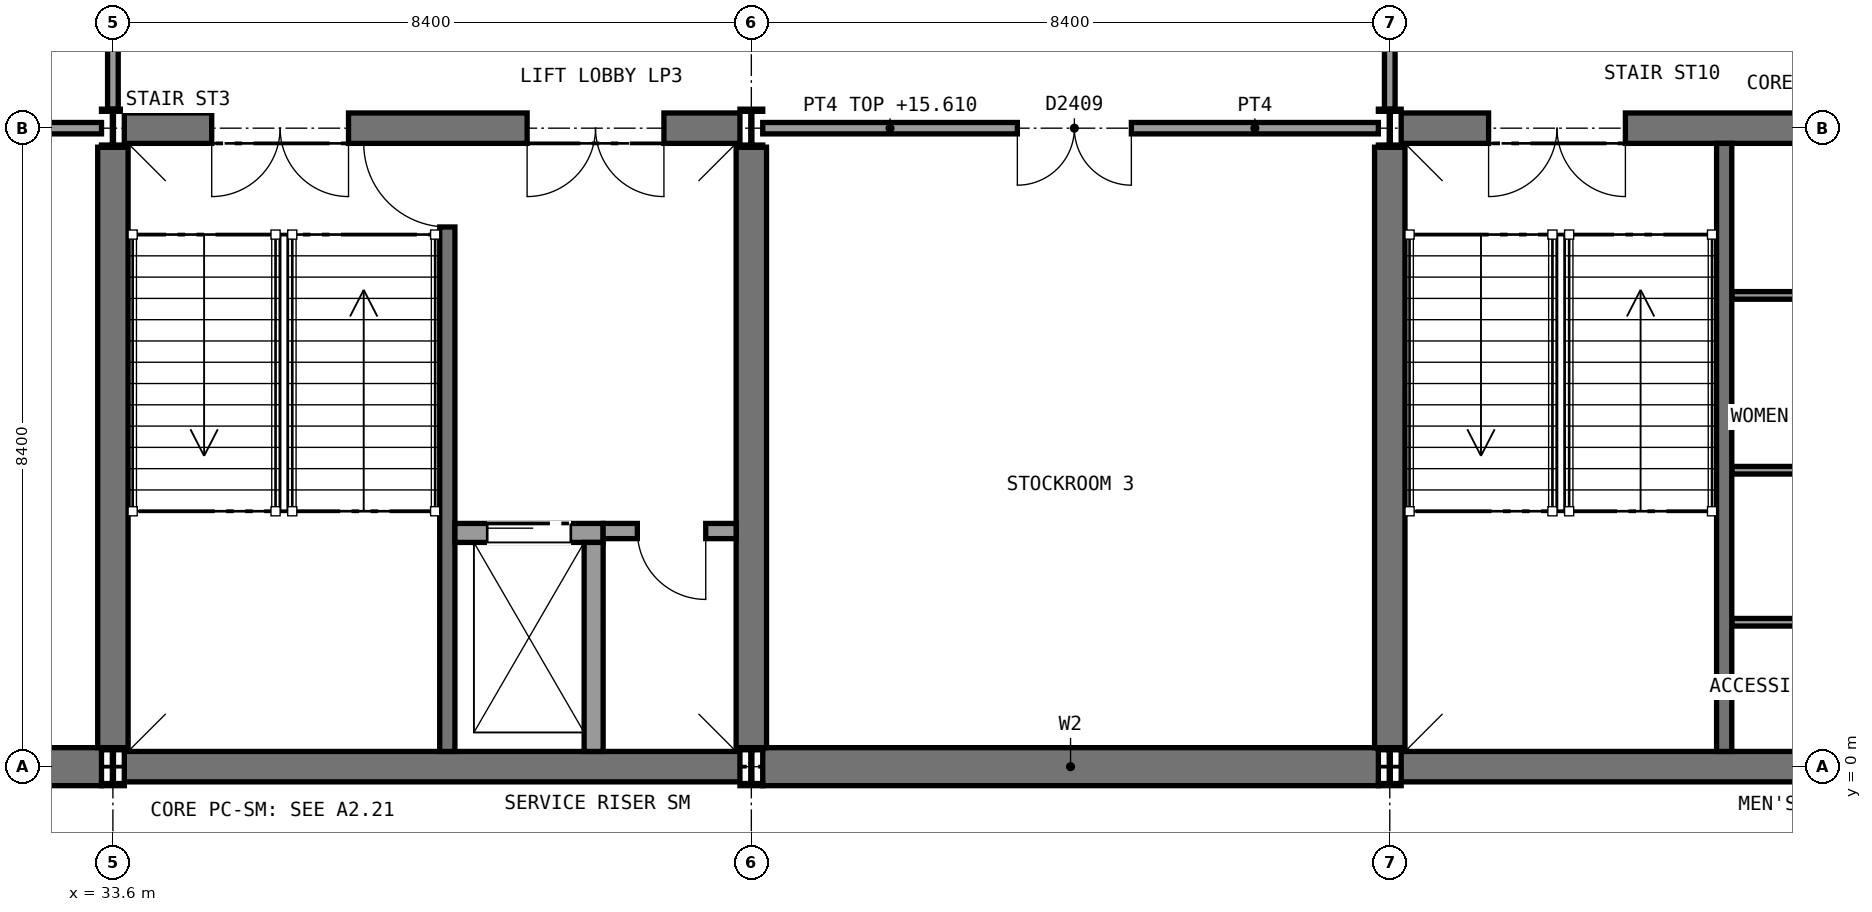
"""IFC4 building model, lengths in metres.
Left out: names, types, materials, properties, quantities, classifications, styles, units other than length and angle.
Written with IfcOpenShell. Run it as: python <this file> out.ifc"""

import sys

from ifc_helpers import new_model, si_unit, direction, frame, frame_2d, origin, origin_2d, place, context, subcontext, project, spatial, rectangle, i_section, extrude, element, fill, save


model = new_model("IFC4")
c1 = context("Model", 3, precision=1e-05, world=origin(), true_north=direction((0.0, 1.0)))
c2 = subcontext(c1, "Body", "Model", "MODEL_VIEW")
j1 = project(units=[si_unit("LENGTHUNIT", "METRE"), si_unit("PLANEANGLEUNIT", "RADIAN")], contexts=[c1])
p1 = place(None, origin())
s1 = spatial("IfcSite", under=j1, at=p1, CompositionType="ELEMENT")
p2 = place(p1, origin())
s2 = spatial("IfcBuilding", under=s1, at=p2, CompositionType="ELEMENT")
p3 = place(p2, frame((0.0, 0.0, 11.4)))
s3 = spatial("IfcBuildingStorey", under=s2, at=p3, CompositionType="ELEMENT", Elevation=11.4)
p4 = place(p3, frame((25.35, 0.0, 0.0), z_axis=(0.0, 0.0, 1.0), x_axis=(1.0, 0.0, 0.0)))
e1 = element("IfcWall", 1, at=p4, inside=s3, PredefinedType="SHEAR", context=c2, shape_type="SweptSolid", body=[
    extrude(rectangle(XDim=8.1, YDim=0.5, at=frame_2d((4.05, 0.0))), origin(), (0.0, 0.0, 1.0), 4.65),
])
p5 = place(p3, frame((42.15, 0.0, 0.0), z_axis=(0.0, 0.0, 1.0), x_axis=(1.0, 0.0, 0.0)))
e2 = element("IfcWall", 2, at=p5, inside=s3, PredefinedType="SHEAR", context=c2, shape_type="SweptSolid", body=[
    extrude(rectangle(XDim=8.1, YDim=0.5, at=frame_2d((4.05, 0.0))), origin(), (0.0, 0.0, 1.0), 4.65),
])
p6 = place(p3, frame((33.75, 0.0, 0.0), z_axis=(0.0, 0.0, 1.0), x_axis=(1.0, 0.0, 0.0)))
e3 = element("IfcWall", 3, at=p6, inside=s3, PredefinedType="SHEAR", context=c2, shape_type="SweptSolid", body=[
    extrude(rectangle(XDim=8.1, YDim=0.4, at=frame_2d((4.05, 0.0))), origin(), (0.0, 0.0, 1.0), 4.65),
])
p7 = place(p3, frame((33.75, 8.4, 0.0), z_axis=(0.0, 0.0, 1.0), x_axis=(1.0, 0.0, 0.0)))
e4 = element("IfcWall", 4, at=p7, inside=s3, PredefinedType="SHEAR", context=c2, shape_type="SweptSolid", body=[
    extrude(rectangle(XDim=8.1, YDim=0.4, at=frame_2d((4.05, 0.0))), origin(), (0.0, 0.0, 1.0), 4.65),
])
p8 = place(p7, frame((1.15, 0.0, 0.0)))
e5 = element("IfcOpeningElement", 5, at=p8, cuts=e4, PredefinedType="OPENING", context=c2, shape_type="SweptSolid", body=[
    extrude(rectangle(XDim=1.8, YDim=2.1, at=frame_2d((0.9, 1.05))), frame((0.0, 0.21, 0.0), z_axis=(0.0, -1.0, 0.0), x_axis=(1.0, 0.0, 0.0)), (0.0, 0.0, 1.0), 0.42),
])
p9 = place(p7, frame((5.3, 0.0, 0.0)))
e6 = element("IfcOpeningElement", 6, at=p9, cuts=e4, PredefinedType="OPENING", context=c2, shape_type="SweptSolid", body=[
    extrude(rectangle(XDim=1.8, YDim=2.1, at=frame_2d((0.9, 1.05))), frame((0.0, 0.21, 0.0), z_axis=(0.0, -1.0, 0.0), x_axis=(1.0, 0.0, 0.0)), (0.0, 0.0, 1.0), 0.42),
])
for number, where, z_axis, x_axis in (
    (7, (33.6, 0.25, 0.0), (0.0, 0.0, 1.0), (0.0, 1.0, 0.0)),
    (8, (42.0, 0.25, 0.0), (0.0, 0.0, 1.0), (0.0, 1.0, 0.0)),
):
    element("IfcWall", number, at=place(p3, frame(where, z_axis=z_axis, x_axis=x_axis)), inside=s3, PredefinedType="SHEAR", context=c2, shape_type="SweptSolid", body=[
        extrude(rectangle(XDim=7.9, YDim=0.4, at=frame_2d((3.95, 0.0))), origin(), (0.0, 0.0, 1.0), 4.65),
    ])
p10 = place(p3, frame((50.55, 0.0, 0.0), z_axis=(0.0, 0.0, 1.0), x_axis=(1.0, 0.0, 0.0)))
e9 = element("IfcWall", 9, at=p10, inside=s3, PredefinedType="SHEAR", context=c2, shape_type="SweptSolid", body=[
    extrude(rectangle(XDim=8.1, YDim=0.4, at=frame_2d((4.05, 0.0))), origin(), (0.0, 0.0, 1.0), 4.65),
])
p11 = place(p3, frame((50.55, 8.4, 0.0), z_axis=(0.0, 0.0, 1.0), x_axis=(1.0, 0.0, 0.0)))
e10 = element("IfcWall", 10, at=p11, inside=s3, PredefinedType="SHEAR", context=c2, shape_type="SweptSolid", body=[
    extrude(rectangle(XDim=8.1, YDim=0.4, at=frame_2d((4.05, 0.0))), origin(), (0.0, 0.0, 1.0), 4.65),
])
p12 = place(p11, frame((1.15, 0.0, 0.0)))
e11 = element("IfcOpeningElement", 11, at=p12, cuts=e10, PredefinedType="OPENING", context=c2, shape_type="SweptSolid", body=[
    extrude(rectangle(XDim=1.8, YDim=2.1, at=frame_2d((0.9, 1.05))), frame((0.0, 0.21, 0.0), z_axis=(0.0, -1.0, 0.0), x_axis=(1.0, 0.0, 0.0)), (0.0, 0.0, 1.0), 0.42),
])
p13 = place(p11, frame((5.6, 0.0, 0.0)))
e12 = element("IfcOpeningElement", 12, at=p13, cuts=e10, PredefinedType="OPENING", context=c2, shape_type="SweptSolid", body=[
    extrude(rectangle(XDim=1.2, YDim=2.1, at=frame_2d((0.6, 1.05))), frame((0.0, 0.21, 0.0), z_axis=(0.0, -1.0, 0.0), x_axis=(1.0, 0.0, 0.0)), (0.0, 0.0, 1.0), 0.42),
])
p14 = place(p3, frame((50.4, 0.25, 0.0), z_axis=(0.0, 0.0, 1.0), x_axis=(0.0, 1.0, 0.0)))
e13 = element("IfcWall", 13, at=p14, inside=s3, PredefinedType="SHEAR", context=c2, shape_type="SweptSolid", body=[
    extrude(rectangle(XDim=7.9, YDim=0.4, at=frame_2d((3.95, 0.0))), origin(), (0.0, 0.0, 1.0), 4.65),
])
for number, where, z_axis, x_axis in (
    (14, (33.6, 0.0, 0.0), (0.0, 0.0, 1.0), (1.0, 0.0, 0.0)),
    (15, (33.6, 8.4, 0.0), (0.0, 0.0, 1.0), (1.0, 0.0, 0.0)),
    (16, (42.0, 0.0, 0.0), (0.0, 0.0, 1.0), (1.0, 0.0, 0.0)),
    (17, (42.0, 8.4, 0.0), (0.0, 0.0, 1.0), (1.0, 0.0, 0.0)),
    (18, (50.4, 0.0, 0.0), (0.0, 0.0, 1.0), (1.0, 0.0, 0.0)),
    (19, (50.4, 8.4, 0.0), (0.0, 0.0, 1.0), (1.0, 0.0, 0.0)),
):
    element("IfcColumn", number, at=place(p3, frame(where, z_axis=z_axis, x_axis=x_axis)), inside=s3, PredefinedType="COLUMN", context=c2, shape_type="SweptSolid", body=[
        extrude(i_section(OverallWidth=0.3, OverallDepth=0.5, WebThickness=0.014, FlangeThickness=0.028, FilletRadius=0.027, at=origin_2d()), origin(), (0.0, 0.0, 1.0), 4.8),
    ])
p15 = place(p3, frame((54.9, 6.2, 0.0), z_axis=(0.0, 0.0, 1.0), x_axis=(1.0, 0.0, 0.0)))
e20 = element("IfcWall", 20, at=p15, inside=s3, PredefinedType="PARTITIONING", context=c2, shape_type="SweptSolid", body=[
    extrude(rectangle(XDim=2.4, YDim=0.1, at=frame_2d((1.2, 0.0))), origin(), (0.0, 0.0, 1.0), 4.58),
])
p16 = place(p15, frame((0.85, 0.0, 0.0)))
e21 = element("IfcOpeningElement", 21, at=p16, cuts=e20, PredefinedType="OPENING", context=c2, shape_type="SweptSolid", body=[
    extrude(rectangle(XDim=0.9, YDim=2.1, at=frame_2d((0.45, 1.05))), frame((0.0, 0.06, 0.0), z_axis=(0.0, -1.0, 0.0), x_axis=(1.0, 0.0, 0.0)), (0.0, 0.0, 1.0), 0.12),
])
for number, where, z_axis, x_axis in (
    (22, (54.9, 3.9, 0.0), (0.0, 0.0, 1.0), (1.0, 0.0, 0.0)),
    (23, (54.9, 1.9, 0.0), (0.0, 0.0, 1.0), (1.0, 0.0, 0.0)),
):
    element("IfcWall", number, at=place(p3, frame(where, z_axis=z_axis, x_axis=x_axis)), inside=s3, PredefinedType="PARTITIONING", context=c2, shape_type="SweptSolid", body=[
        extrude(rectangle(XDim=2.4, YDim=0.1, at=frame_2d((1.2, 0.0))), origin(), (0.0, 0.0, 1.0), 4.58),
    ])
p17 = place(p3, frame((25.35, 8.4, 0.0), z_axis=(0.0, 0.0, 1.0), x_axis=(1.0, 0.0, 0.0)))
e24 = element("IfcWall", 24, at=p17, inside=s3, PredefinedType="SOLIDWALL", context=c2, shape_type="SweptSolid", body=[
    extrude(rectangle(XDim=8.1, YDim=0.15, at=frame_2d((4.05, 0.0))), origin(), (0.0, 0.0, 1.0), 4.32),
])
p18 = place(p17, frame((3.35, 0.0, 0.0)))
e25 = element("IfcOpeningElement", 25, at=p18, cuts=e24, PredefinedType="OPENING", context=c2, shape_type="SweptSolid", body=[
    extrude(rectangle(XDim=1.5, YDim=2.1, at=frame_2d((0.75, 1.05))), frame((0.0, 0.085, 0.0), z_axis=(0.0, -1.0, 0.0), x_axis=(1.0, 0.0, 0.0)), (0.0, 0.0, 1.0), 0.17),
])
p19 = place(p3, frame((42.15, 8.4, 0.0), z_axis=(0.0, 0.0, 1.0), x_axis=(1.0, 0.0, 0.0)))
e26 = element("IfcWall", 26, at=p19, inside=s3, PredefinedType="SOLIDWALL", context=c2, shape_type="SweptSolid", body=[
    extrude(rectangle(XDim=8.1, YDim=0.15, at=frame_2d((4.05, 0.0))), origin(), (0.0, 0.0, 1.0), 4.21),
])
p20 = place(p19, frame((3.35, 0.0, 0.0)))
e27 = element("IfcOpeningElement", 27, at=p20, cuts=e26, PredefinedType="OPENING", context=c2, shape_type="SweptSolid", body=[
    extrude(rectangle(XDim=1.5, YDim=2.1, at=frame_2d((0.75, 1.05))), frame((0.0, 0.085, 0.0), z_axis=(0.0, -1.0, 0.0), x_axis=(1.0, 0.0, 0.0)), (0.0, 0.0, 1.0), 0.17),
])
for number, where, z_axis, x_axis in (
    (28, (33.6, 8.65, 0.0), (0.0, 0.0, 1.0), (0.0, 1.0, 0.0)),
    (29, (50.4, 8.65, 0.0), (0.0, 0.0, 1.0), (0.0, 1.0, 0.0)),
):
    element("IfcWall", number, at=place(p3, frame(where, z_axis=z_axis, x_axis=x_axis)), inside=s3, PredefinedType="PARTITIONING", context=c2, shape_type="SweptSolid", body=[
        extrude(rectangle(XDim=3.1, YDim=0.14, at=frame_2d((1.55, 0.0))), origin(), (0.0, 0.0, 1.0), 4.21),
    ])
p21 = place(p3, frame((38.0, 0.2, 0.0), z_axis=(0.0, 0.0, 1.0), x_axis=(0.0, 1.0, 0.0)))
e30 = element("IfcWall", 30, at=p21, inside=s3, PredefinedType="SHEAR", context=c2, shape_type="SweptSolid", body=[
    extrude(rectangle(XDim=8.0, YDim=0.2, at=frame_2d((4.0, 0.0))), origin(), (0.0, 0.0, 1.0), 4.65),
])
p22 = place(p21, frame((6.9, 0.0, 0.0)))
e31 = element("IfcOpeningElement", 31, at=p22, cuts=e30, PredefinedType="OPENING", context=c2, shape_type="SweptSolid", body=[
    extrude(rectangle(XDim=1.11, YDim=2.1, at=frame_2d((0.555, 1.05))), frame((0.0, 0.11, 0.0), z_axis=(0.0, -1.0, 0.0), x_axis=(1.0, 0.0, 0.0)), (0.0, 0.0, 1.0), 0.22),
])
p23 = place(p3, frame((38.1, 3.075, 0.0), z_axis=(0.0, 0.0, 1.0), x_axis=(1.0, 0.0, 0.0)))
e32 = element("IfcWall", 32, at=p23, inside=s3, PredefinedType="SOLIDWALL", context=c2, shape_type="SweptSolid", body=[
    extrude(rectangle(XDim=1.95, YDim=0.25, at=frame_2d((0.975, 0.0))), origin(), (0.0, 0.0, 1.0), 4.8),
])
p24 = place(p23, frame((0.425, 0.0, 0.0)))
e33 = element("IfcOpeningElement", 33, at=p24, cuts=e32, PredefinedType="OPENING", context=c2, shape_type="SweptSolid", body=[
    extrude(rectangle(XDim=1.1, YDim=2.1, at=frame_2d((0.55, 1.05))), frame((0.0, 0.135, 0.0), z_axis=(0.0, -1.0, 0.0), x_axis=(1.0, 0.0, 0.0)), (0.0, 0.0, 1.0), 0.27),
])
p25 = place(p3, frame((39.925, 0.2, 0.0), z_axis=(0.0, 0.0, 1.0), x_axis=(0.0, 1.0, 0.0)))
e34 = element("IfcWall", 34, at=p25, inside=s3, PredefinedType="SOLIDWALL", context=c2, shape_type="SweptSolid", body=[
    extrude(rectangle(XDim=2.75, YDim=0.25, at=frame_2d((1.375, 0.0))), origin(), (0.0, 0.0, 1.0), 4.8),
])
p26 = place(p3, frame((40.05, 3.1, 0.0), z_axis=(0.0, 0.0, 1.0), x_axis=(1.0, 0.0, 0.0)))
e35 = element("IfcWall", 35, at=p26, inside=s3, PredefinedType="PARTITIONING", context=c2, shape_type="SweptSolid", body=[
    extrude(rectangle(XDim=1.75, YDim=0.2, at=frame_2d((0.875, 0.0))), origin(), (0.0, 0.0, 1.0), 4.65),
])
p27 = place(p26, frame((0.45, 0.0, 0.0)))
e36 = element("IfcOpeningElement", 36, at=p27, cuts=e35, PredefinedType="OPENING", context=c2, shape_type="SweptSolid", body=[
    extrude(rectangle(XDim=0.9, YDim=2.1, at=frame_2d((0.45, 1.05))), frame((0.0, 0.11, 0.0), z_axis=(0.0, -1.0, 0.0), x_axis=(1.0, 0.0, 0.0)), (0.0, 0.0, 1.0), 0.22),
])
p28 = place(p3, frame((54.8, 0.2, 0.0), z_axis=(0.0, 0.0, 1.0), x_axis=(0.0, 1.0, 0.0)))
e37 = element("IfcWall", 37, at=p28, inside=s3, PredefinedType="SHEAR", context=c2, shape_type="SweptSolid", body=[
    extrude(rectangle(XDim=8.0, YDim=0.2, at=frame_2d((4.0, 0.0))), origin(), (0.0, 0.0, 1.0), 4.65),
])
p29 = place(p20, frame((1.5, 0.0, 0.0), z_axis=(0.0, 0.0, 1.0), x_axis=(-1.0, 0.0, 0.0)))
e38 = element("IfcDoor", 38, at=p29, inside=s3, OperationType="DOUBLE_DOOR_SINGLE_SWING", PredefinedType="DOOR", context=c2, shape_type="SweptSolid", body=[
    extrude(rectangle(XDim=1.5, YDim=2.1, at=frame_2d((0.75, 1.05))), frame((0.0, 0.025, 0.0), z_axis=(0.0, -1.0, 0.0), x_axis=(1.0, 0.0, 0.0)), (0.0, 0.0, 1.0), 0.05),
])
fill(e27, e38)
p30 = place(p22, origin())
e39 = element("IfcDoor", 39, at=p30, inside=s3, OperationType="SINGLE_SWING_RIGHT", PredefinedType="DOOR", context=c2, shape_type="SweptSolid", body=[
    extrude(rectangle(XDim=1.1, YDim=2.1, at=frame_2d((0.55, 1.05))), frame((0.0, 0.025, 0.0), z_axis=(0.0, -1.0, 0.0), x_axis=(1.0, 0.0, 0.0)), (0.0, 0.0, 1.0), 0.05),
])
fill(e31, e39)
p31 = place(p24, origin())
e40 = element("IfcDoor", 40, at=p31, inside=s3, OperationType="SLIDING_TO_LEFT", PredefinedType="DOOR", context=c2, shape_type="SweptSolid", body=[
    extrude(rectangle(XDim=1.1, YDim=2.1, at=frame_2d((0.55, 1.05))), frame((0.0, 0.025, 0.0), z_axis=(0.0, -1.0, 0.0), x_axis=(1.0, 0.0, 0.0)), (0.0, 0.0, 1.0), 0.05),
])
fill(e33, e40)
p32 = place(p27, frame((0.9, 0.0, 0.0), z_axis=(0.0, 0.0, 1.0), x_axis=(-1.0, 0.0, 0.0)))
e41 = element("IfcDoor", 41, at=p32, inside=s3, OperationType="SINGLE_SWING_LEFT", PredefinedType="DOOR", context=c2, shape_type="SweptSolid", body=[
    extrude(rectangle(XDim=0.9, YDim=2.1, at=frame_2d((0.45, 1.05))), frame((0.0, 0.025, 0.0), z_axis=(0.0, -1.0, 0.0), x_axis=(1.0, 0.0, 0.0)), (0.0, 0.0, 1.0), 0.05),
])
fill(e36, e41)
p33 = place(p8, frame((1.8, 0.0, 0.0), z_axis=(0.0, 0.0, 1.0), x_axis=(-1.0, 0.0, 0.0)))
e42 = element("IfcDoor", 42, at=p33, inside=s3, OperationType="DOUBLE_DOOR_SINGLE_SWING", PredefinedType="DOOR", context=c2, shape_type="SweptSolid", body=[
    extrude(rectangle(XDim=1.8, YDim=2.1, at=frame_2d((0.9, 1.05))), frame((0.0, 0.025, 0.0), z_axis=(0.0, -1.0, 0.0), x_axis=(1.0, 0.0, 0.0)), (0.0, 0.0, 1.0), 0.05),
])
fill(e5, e42)
p34 = place(p9, frame((1.8, 0.0, 0.0), z_axis=(0.0, 0.0, 1.0), x_axis=(-1.0, 0.0, 0.0)))
e43 = element("IfcDoor", 43, at=p34, inside=s3, OperationType="DOUBLE_DOOR_SINGLE_SWING", PredefinedType="DOOR", context=c2, shape_type="SweptSolid", body=[
    extrude(rectangle(XDim=1.8, YDim=2.1, at=frame_2d((0.9, 1.05))), frame((0.0, 0.025, 0.0), z_axis=(0.0, -1.0, 0.0), x_axis=(1.0, 0.0, 0.0)), (0.0, 0.0, 1.0), 0.05),
])
fill(e6, e43)
p35 = place(p12, frame((1.8, 0.0, 0.0), z_axis=(0.0, 0.0, 1.0), x_axis=(-1.0, 0.0, 0.0)))
e44 = element("IfcDoor", 44, at=p35, inside=s3, OperationType="DOUBLE_DOOR_SINGLE_SWING", PredefinedType="DOOR", context=c2, shape_type="SweptSolid", body=[
    extrude(rectangle(XDim=1.8, YDim=2.1, at=frame_2d((0.9, 1.05))), frame((0.0, 0.025, 0.0), z_axis=(0.0, -1.0, 0.0), x_axis=(1.0, 0.0, 0.0)), (0.0, 0.0, 1.0), 0.05),
])
fill(e11, e44)
save(model, sys.argv[1])
